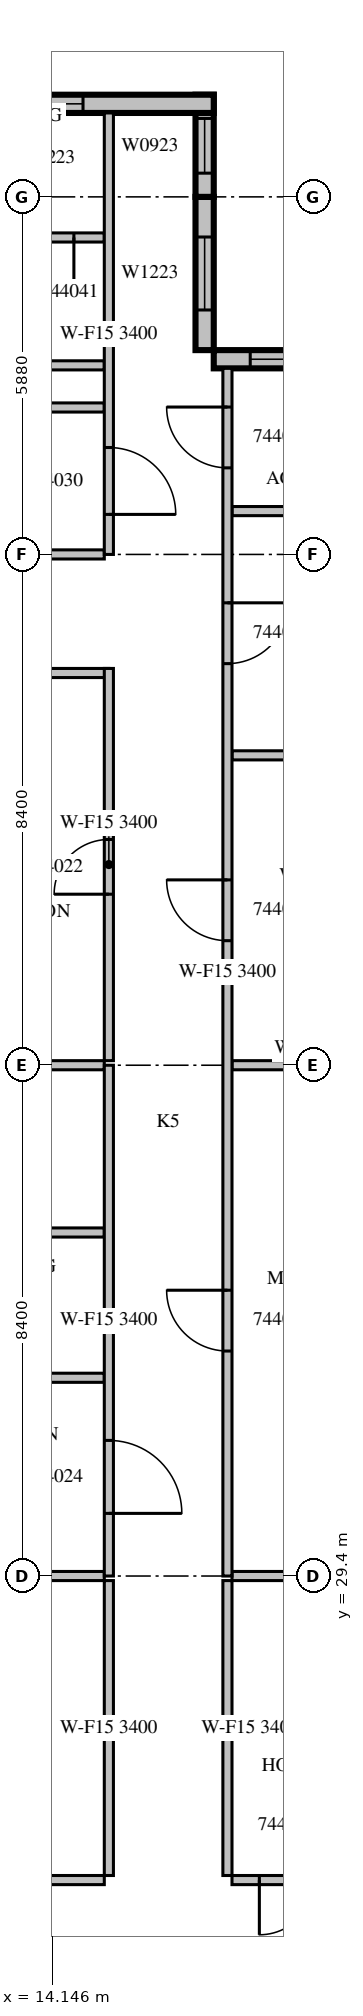
"""IFC4 building model, lengths in metres.
Left out: names, types, materials, properties, quantities, classifications, styles, units other than length and angle.
Written with IfcOpenShell. Run it as: python <this file> out.ifc"""

import sys

from ifc_helpers import new_model, si_unit, direction, frame, frame_2d, origin, place, context, subcontext, project, spatial, rectangle, extrude, source, transform, mapped, element, fill, save


model = new_model("IFC4")
c1 = context("Model", 3, precision=1e-05, world=origin(), true_north=direction((0.0, 1.0)))
c2 = subcontext(c1, "Body", "Model", "MODEL_VIEW")
j1 = project(units=[si_unit("LENGTHUNIT", "METRE"), si_unit("PLANEANGLEUNIT", "RADIAN")], contexts=[c1])
p1 = place(None, origin())
s1 = spatial("IfcSite", under=j1, at=p1, CompositionType="ELEMENT")
p2 = place(p1, origin())
s2 = spatial("IfcBuilding", under=s1, at=p2, CompositionType="ELEMENT")
p3 = place(p2, frame((0.0, 0.0, 200.6)))
s3 = spatial("IfcBuildingStorey", under=s2, at=p3, CompositionType="ELEMENT", Elevation=200.6)
m1 = source(origin(), c2, "Body", "SweptSolid", [
    extrude(rectangle(XDim=4.2, YDim=0.3, at=frame_2d((2.1, 0.0))), origin(), (0.0, 0.0, 1.0), 3.4),
])
p4 = place(p3, frame((21.0, 49.41, 0.0), z_axis=(0.0, 0.0, 1.0), x_axis=(-1.0, 0.0, 0.0)))
e1 = element("IfcWall", 1, at=p4, inside=s3, PredefinedType="STANDARD", context=c2, shape_type="MappedRepresentation", body=[
    mapped(m1, transform((0.0, 0.0, 0.0), scale=1.0)),
])
m2 = source(origin(), c2, "Body", "SweptSolid", [
    extrude(rectangle(XDim=3.0, YDim=2.3, at=frame_2d((1.5, 1.15))), frame((0.0, 0.16, 0.0), z_axis=(0.0, -1.0, 0.0), x_axis=(1.0, 0.0, 0.0)), (0.0, 0.0, 1.0), 0.32),
])
p5 = place(p4, frame((0.6, 0.0, 0.6)))
e2 = element("IfcOpeningElement", 2, at=p5, cuts=e1, PredefinedType="OPENING", context=c2, shape_type="MappedRepresentation", body=[
    mapped(m2, transform((0.0, 0.0, 0.0), scale=1.0)),
])
m3 = source(origin(), c2, "Body", "SweptSolid", [
    extrude(rectangle(XDim=2.52, YDim=0.3, at=frame_2d((1.26, 0.0))), origin(), (0.0, 0.0, 1.0), 3.4),
])
p6 = place(p3, frame((16.65, 49.56, 0.0), z_axis=(0.0, 0.0, 1.0), x_axis=(0.0, 1.0, 0.0)))
e3 = element("IfcWall", 3, at=p6, inside=s3, PredefinedType="STANDARD", context=c2, shape_type="MappedRepresentation", body=[
    mapped(m3, transform((0.0, 0.0, 0.0), scale=1.0)),
])
m4 = source(origin(), c2, "Body", "SweptSolid", [
    extrude(rectangle(XDim=1.2, YDim=2.3, at=frame_2d((0.6, 1.15))), frame((0.0, 0.16, 0.0), z_axis=(0.0, -1.0, 0.0), x_axis=(1.0, 0.0, 0.0)), (0.0, 0.0, 1.0), 0.32),
])
p7 = place(p6, frame((0.66, 0.0, 0.6)))
e4 = element("IfcOpeningElement", 4, at=p7, cuts=e3, PredefinedType="OPENING", context=c2, shape_type="MappedRepresentation", body=[
    mapped(m4, transform((0.0, 0.0, 0.0), scale=1.0)),
])
m5 = source(origin(), c2, "Body", "SweptSolid", [
    extrude(rectangle(XDim=1.68, YDim=0.3, at=frame_2d((0.84, 0.0))), origin(), (0.0, 0.0, 1.0), 3.4),
])
p8 = place(p3, frame((16.65, 52.08, 0.0), z_axis=(0.0, 0.0, 1.0), x_axis=(0.0, 1.0, 0.0)))
e5 = element("IfcWall", 5, at=p8, inside=s3, PredefinedType="STANDARD", context=c2, shape_type="MappedRepresentation", body=[
    mapped(m5, transform((0.0, 0.0, 0.0), scale=1.0)),
])
m6 = source(origin(), c2, "Body", "SweptSolid", [
    extrude(rectangle(XDim=0.9, YDim=2.3, at=frame_2d((0.45, 1.15))), frame((0.0, 0.16, 0.0), z_axis=(0.0, -1.0, 0.0), x_axis=(1.0, 0.0, 0.0)), (0.0, 0.0, 1.0), 0.32),
])
p9 = place(p8, frame((0.39, 0.0, 0.6)))
e6 = element("IfcOpeningElement", 6, at=p9, cuts=e5, PredefinedType="OPENING", context=c2, shape_type="MappedRepresentation", body=[
    mapped(m6, transform((0.0, 0.0, 0.0), scale=1.0)),
])
m7 = source(origin(), c2, "Body", "SweptSolid", [
    extrude(rectangle(XDim=10.5, YDim=0.3, at=frame_2d((5.25, 0.0))), origin(), (0.0, 0.0, 1.0), 3.4),
])
p10 = place(p3, frame((16.8, 53.61, 0.0), z_axis=(0.0, 0.0, 1.0), x_axis=(-1.0, 0.0, 0.0)))
e7 = element("IfcWall", 7, at=p10, inside=s3, PredefinedType="STANDARD", context=c2, shape_type="MappedRepresentation", body=[
    mapped(m7, transform((0.0, 0.0, 0.0), scale=1.0)),
])
p11 = place(p10, frame((2.15, 0.0, 0.6)))
e8 = element("IfcOpeningElement", 8, at=p11, cuts=e7, PredefinedType="OPENING", context=c2, shape_type="MappedRepresentation", body=[
    mapped(m4, transform((0.0, 0.0, 0.0), scale=1.0)),
])
m8 = source(origin(), c2, "Body", "SweptSolid", [
    extrude(rectangle(XDim=1.8, YDim=2.3, at=frame_2d((0.9, 1.15))), frame((0.0, 0.16, 0.0), z_axis=(0.0, -1.0, 0.0), x_axis=(1.0, 0.0, 0.0)), (0.0, 0.0, 1.0), 0.32),
])
p12 = place(p10, frame((8.025, 0.0, 0.6)))
e9 = element("IfcOpeningElement", 9, at=p12, cuts=e7, PredefinedType="OPENING", context=c2, shape_type="MappedRepresentation", body=[
    mapped(m8, transform((0.0, 0.0, 0.0), scale=1.0)),
])
m9 = source(origin(), c2, "Body", "SweptSolid", [
    extrude(rectangle(XDim=8.495, YDim=0.15, at=frame_2d((4.247, 0.0))), origin(), (0.0, 0.0, 1.0), 3.4),
])
p13 = place(p3, frame((6.505, 24.4, 0.0), z_axis=(0.0, 0.0, 1.0), x_axis=(1.0, 0.0, 0.0)))
e10 = element("IfcWall", 10, at=p13, inside=s3, PredefinedType="PARTITIONING", context=c2, shape_type="MappedRepresentation", body=[
    mapped(m9, transform((0.0, 0.0, 0.0), scale=1.0)),
])
m10 = source(origin(), c2, "Body", "SweptSolid", [
    extrude(rectangle(XDim=0.9, YDim=2.1, at=frame_2d((0.45, 1.05))), frame((0.0, 0.085, 0.0), z_axis=(0.0, -1.0, 0.0), x_axis=(1.0, 0.0, 0.0)), (0.0, 0.0, 1.0), 0.17),
])
p14 = place(p13, frame((1.045, 0.0, 0.0)))
e11 = element("IfcOpeningElement", 11, at=p14, cuts=e10, PredefinedType="OPENING", context=c2, shape_type="MappedRepresentation", body=[
    mapped(m10, transform((0.0, 0.0, 0.0), scale=1.0)),
])
p15 = place(p13, frame((6.12, 0.0, 0.0)))
e12 = element("IfcOpeningElement", 12, at=p15, cuts=e10, PredefinedType="OPENING", context=c2, shape_type="MappedRepresentation", body=[
    mapped(m10, transform((0.0, 0.0, 0.0), scale=1.0)),
])
m11 = source(origin(), c2, "Body", "SweptSolid", [
    extrude(rectangle(XDim=3.6, YDim=0.15, at=frame_2d((1.8, 0.0))), origin(), (0.0, 0.0, 1.0), 3.4),
])
p16 = place(p3, frame((17.1, 24.4, 0.0), z_axis=(0.0, 0.0, 1.0), x_axis=(1.0, 0.0, 0.0)))
e13 = element("IfcWall", 13, at=p16, inside=s3, PredefinedType="PARTITIONING", context=c2, shape_type="MappedRepresentation", body=[
    mapped(m11, transform((0.0, 0.0, 0.0), scale=1.0)),
])
p17 = place(p16, frame((0.45, 0.0, 0.0)))
e14 = element("IfcOpeningElement", 14, at=p17, cuts=e13, PredefinedType="OPENING", context=c2, shape_type="MappedRepresentation", body=[
    mapped(m10, transform((0.0, 0.0, 0.0), scale=1.0)),
])
m12 = source(origin(), c2, "Body", "SweptSolid", [
    extrude(rectangle(XDim=4.85, YDim=0.15, at=frame_2d((2.425, 0.0))), origin(), (0.0, 0.0, 1.0), 3.4),
])
for number, where, z_axis, x_axis in (
    (15, (15.075, 24.475, 0.0), (0.0, 0.0, 1.0), (0.0, 1.0, 0.0)),
    (16, (17.025, 29.325, 0.0), (0.0, 0.0, 1.0), (0.0, -1.0, 0.0)),
):
    element("IfcWall", number, at=place(p3, frame(where, z_axis=z_axis, x_axis=x_axis)), inside=s3, PredefinedType="PARTITIONING", context=c2, shape_type="MappedRepresentation", body=[
        mapped(m12, transform((0.0, 0.0, 0.0), scale=1.0)),
    ])
m13 = source(origin(), c2, "Body", "SweptSolid", [
    extrude(rectangle(XDim=4.051, YDim=0.15, at=frame_2d((2.026, 0.0))), origin(), (0.0, 0.0, 1.0), 3.4),
])
p18 = place(p3, frame((15.0, 29.4, 0.0), z_axis=(0.0, 0.0, 1.0), x_axis=(-1.0, 0.0, 0.0)))
e17 = element("IfcWall", 17, at=p18, inside=s3, PredefinedType="PARTITIONING", context=c2, shape_type="MappedRepresentation", body=[
    mapped(m13, transform((0.0, 0.0, 0.0), scale=1.0)),
])
m14 = source(origin(), c2, "Body", "SweptSolid", [
    extrude(rectangle(XDim=3.001, YDim=0.15, at=frame_2d((1.5, 0.0))), origin(), (0.0, 0.0, 1.0), 3.4),
])
p19 = place(p3, frame((20.101, 29.4, 0.0), z_axis=(0.0, 0.0, 1.0), x_axis=(-1.0, 0.0, 0.0)))
e18 = element("IfcWall", 18, at=p19, inside=s3, PredefinedType="PARTITIONING", context=c2, shape_type="MappedRepresentation", body=[
    mapped(m14, transform((0.0, 0.0, 0.0), scale=1.0)),
])
m15 = source(origin(), c2, "Body", "SweptSolid", [
    extrude(rectangle(XDim=3.975, YDim=0.15, at=frame_2d((1.988, 0.0))), origin(), (0.0, 0.0, 1.0), 3.4),
])
p20 = place(p3, frame((15.075, 44.25, 0.0), z_axis=(0.0, 0.0, 1.0), x_axis=(-1.0, 0.0, 0.0)))
e19 = element("IfcWall", 19, at=p20, inside=s3, PredefinedType="PARTITIONING", context=c2, shape_type="MappedRepresentation", body=[
    mapped(m15, transform((0.0, 0.0, 0.0), scale=1.0)),
])
m16 = source(origin(), c2, "Body", "SweptSolid", [
    extrude(rectangle(XDim=6.45, YDim=0.15, at=frame_2d((3.225, 0.0))), origin(), (0.0, 0.0, 1.0), 3.4),
])
p21 = place(p3, frame((15.075, 37.875, 0.0), z_axis=(0.0, 0.0, 1.0), x_axis=(0.0, 1.0, 0.0)))
e20 = element("IfcWall", 20, at=p21, inside=s3, PredefinedType="PARTITIONING", context=c2, shape_type="MappedRepresentation", body=[
    mapped(m16, transform((0.0, 0.0, 0.0), scale=1.0)),
])
p22 = place(p21, frame((2.737, 0.0, 0.0)))
e21 = element("IfcOpeningElement", 21, at=p22, cuts=e20, PredefinedType="OPENING", context=c2, shape_type="MappedRepresentation", body=[
    mapped(m10, transform((0.0, 0.0, 0.0), scale=1.0)),
])
m17 = source(origin(), c2, "Body", "SweptSolid", [
    extrude(rectangle(XDim=3.9, YDim=0.15, at=frame_2d((1.95, 0.0))), origin(), (0.0, 0.0, 1.0), 3.4),
])
for number, where, z_axis, x_axis in (
    (22, (15.0, 32.66, 0.0), (0.0, 0.0, 1.0), (-1.0, 0.0, 0.0)),
    (23, (15.0, 35.049, 0.0), (0.0, 0.0, 1.0), (-1.0, 0.0, 0.0)),
    (24, (15.0, 37.8, 0.0), (0.0, 0.0, 1.0), (-1.0, 0.0, 0.0)),
    (25, (15.0, 48.617, 0.0), (0.0, 0.0, 1.0), (-1.0, 0.0, 0.0)),
    (26, (15.0, 49.309, 0.0), (0.0, 0.0, 1.0), (-1.0, 0.0, 0.0)),
):
    element("IfcWall", number, at=place(p3, frame(where, z_axis=z_axis, x_axis=x_axis)), inside=s3, PredefinedType="PARTITIONING", context=c2, shape_type="MappedRepresentation", body=[
        mapped(m17, transform((0.0, 0.0, 0.0), scale=1.0)),
    ])
p23 = place(p3, frame((15.0, 51.412, 0.0), z_axis=(0.0, 0.0, 1.0), x_axis=(-1.0, 0.0, 0.0)))
e27 = element("IfcWall", 27, at=p23, inside=s3, PredefinedType="PARTITIONING", context=c2, shape_type="MappedRepresentation", body=[
    mapped(m17, transform((0.0, 0.0, 0.0), scale=1.0)),
])
p24 = place(p23, frame((1.5, 0.0, 0.0)))
e28 = element("IfcOpeningElement", 28, at=p24, cuts=e27, PredefinedType="OPENING", context=c2, shape_type="MappedRepresentation", body=[
    mapped(m10, transform((0.0, 0.0, 0.0), scale=1.0)),
])
p25 = place(p23, frame((0.5, 0.0, 0.0)))
e29 = element("IfcOpeningElement", 29, at=p25, cuts=e27, PredefinedType="OPENING", context=c2, shape_type="MappedRepresentation", body=[
    mapped(m10, transform((0.0, 0.0, 0.0), scale=1.0)),
])
p26 = place(p23, frame((2.5, 0.0, 0.0)))
e30 = element("IfcOpeningElement", 30, at=p26, cuts=e27, PredefinedType="OPENING", context=c2, shape_type="MappedRepresentation", body=[
    mapped(m10, transform((0.0, 0.0, 0.0), scale=1.0)),
])
p27 = place(p3, frame((15.0, 46.2, 0.0), z_axis=(0.0, 0.0, 1.0), x_axis=(-1.0, 0.0, 0.0)))
e31 = element("IfcWall", 31, at=p27, inside=s3, PredefinedType="PARTITIONING", context=c2, shape_type="MappedRepresentation", body=[
    mapped(m17, transform((0.0, 0.0, 0.0), scale=1.0)),
])
for number, where, z_axis, x_axis in (
    (32, (17.1, 42.896, 0.0), (0.0, 0.0, 1.0), (1.0, 0.0, 0.0)),
    (33, (17.1, 46.913, 0.0), (0.0, 0.0, 1.0), (1.0, 0.0, 0.0)),
):
    element("IfcWall", number, at=place(p3, frame(where, z_axis=z_axis, x_axis=x_axis)), inside=s3, PredefinedType="PARTITIONING", context=c2, shape_type="MappedRepresentation", body=[
        mapped(m11, transform((0.0, 0.0, 0.0), scale=1.0)),
    ])
p28 = place(p3, frame((20.101, 37.8, 0.0), z_axis=(0.0, 0.0, 1.0), x_axis=(-1.0, 0.0, 0.0)))
e34 = element("IfcWall", 34, at=p28, inside=s3, PredefinedType="PARTITIONING", context=c2, shape_type="MappedRepresentation", body=[
    mapped(m14, transform((0.0, 0.0, 0.0), scale=1.0)),
])
m18 = source(origin(), c2, "Body", "SweptSolid", [
    extrude(rectangle(XDim=8.4, YDim=0.15, at=frame_2d((4.2, 0.0))), origin(), (0.0, 0.0, 1.0), 3.4),
])
p29 = place(p3, frame((15.075, 29.4, 0.0), z_axis=(0.0, 0.0, 1.0), x_axis=(0.0, 1.0, 0.0)))
e35 = element("IfcWall", 35, at=p29, inside=s3, PredefinedType="PARTITIONING", context=c2, shape_type="MappedRepresentation", body=[
    mapped(m18, transform((0.0, 0.0, 0.0), scale=1.0)),
])
m19 = source(origin(), c2, "Body", "SweptSolid", [
    extrude(rectangle(XDim=1.2, YDim=2.1, at=frame_2d((0.6, 1.05))), frame((0.0, 0.085, 0.0), z_axis=(0.0, -1.0, 0.0), x_axis=(1.0, 0.0, 0.0)), (0.0, 0.0, 1.0), 0.17),
])
p30 = place(p29, frame((1.03, 0.0, 0.0)))
e36 = element("IfcOpeningElement", 36, at=p30, cuts=e35, PredefinedType="OPENING", context=c2, shape_type="MappedRepresentation", body=[
    mapped(m19, transform((0.0, 0.0, 0.0), scale=1.0)),
])
m20 = source(origin(), c2, "Body", "SweptSolid", [
    extrude(rectangle(XDim=7.26, YDim=0.15, at=frame_2d((3.63, 0.0))), origin(), (0.0, 0.0, 1.0), 3.4),
])
p31 = place(p3, frame((15.075, 46.2, 0.0), z_axis=(0.0, 0.0, 1.0), x_axis=(0.0, 1.0, 0.0)))
e37 = element("IfcWall", 37, at=p31, inside=s3, PredefinedType="PARTITIONING", context=c2, shape_type="MappedRepresentation", body=[
    mapped(m20, transform((0.0, 0.0, 0.0), scale=1.0)),
])
m21 = source(origin(), c2, "Body", "SweptSolid", [
    extrude(rectangle(XDim=1.1, YDim=2.1, at=frame_2d((0.55, 1.05))), frame((0.0, 0.085, 0.0), z_axis=(0.0, -1.0, 0.0), x_axis=(1.0, 0.0, 0.0)), (0.0, 0.0, 1.0), 0.17),
])
p32 = place(p31, frame((0.658, 0.0, 0.0)))
e38 = element("IfcOpeningElement", 38, at=p32, cuts=e37, PredefinedType="OPENING", context=c2, shape_type="MappedRepresentation", body=[
    mapped(m21, transform((0.0, 0.0, 0.0), scale=1.0)),
])
m22 = source(origin(), c2, "Body", "SweptSolid", [
    extrude(rectangle(XDim=19.86, YDim=0.15, at=frame_2d((9.93, 0.0))), origin(), (0.0, 0.0, 1.0), 3.4),
])
p33 = place(p3, frame((17.025, 49.26, 0.0), z_axis=(0.0, 0.0, 1.0), x_axis=(0.0, -1.0, 0.0)))
e39 = element("IfcWall", 39, at=p33, inside=s3, PredefinedType="PARTITIONING", context=c2, shape_type="MappedRepresentation", body=[
    mapped(m22, transform((0.0, 0.0, 0.0), scale=1.0)),
])
m23 = source(origin(), c2, "Body", "SweptSolid", [
    extrude(rectangle(XDim=1.0, YDim=2.1, at=frame_2d((0.5, 1.05))), frame((0.0, 0.085, 0.0), z_axis=(0.0, -1.0, 0.0), x_axis=(1.0, 0.0, 0.0)), (0.0, 0.0, 1.0), 0.17),
])
p34 = place(p33, frame((15.16, 0.0, 0.0)))
e40 = element("IfcOpeningElement", 40, at=p34, cuts=e39, PredefinedType="OPENING", context=c2, shape_type="MappedRepresentation", body=[
    mapped(m23, transform((0.0, 0.0, 0.0), scale=1.0)),
])
p35 = place(p33, frame((8.412, 0.0, 0.0)))
e41 = element("IfcOpeningElement", 41, at=p35, cuts=e39, PredefinedType="OPENING", context=c2, shape_type="MappedRepresentation", body=[
    mapped(m23, transform((0.0, 0.0, 0.0), scale=1.0)),
])
p36 = place(p33, frame((3.856, 0.0, 0.0)))
e42 = element("IfcOpeningElement", 42, at=p36, cuts=e39, PredefinedType="OPENING", context=c2, shape_type="MappedRepresentation", body=[
    mapped(m23, transform((0.0, 0.0, 0.0), scale=1.0)),
])
p37 = place(p33, frame((0.636, 0.0, 0.0)))
e43 = element("IfcOpeningElement", 43, at=p37, cuts=e39, PredefinedType="OPENING", context=c2, shape_type="MappedRepresentation", body=[
    mapped(m23, transform((0.0, 0.0, 0.0), scale=1.0)),
])
m24 = source(origin(), c2, "Body", "SweptSolid", [
    extrude(rectangle(XDim=3.0, YDim=2.3, at=frame_2d((1.5, 1.15))), frame((0.0, 0.03, 0.0), z_axis=(0.0, -1.0, 0.0), x_axis=(1.0, 0.0, 0.0)), (0.0, 0.0, 1.0), 0.06),
])
p38 = place(p5, origin())
e44 = element("IfcWindow", 44, at=p38, inside=s3, PartitioningType="SINGLE_PANEL", PredefinedType="WINDOW", context=c2, shape_type="MappedRepresentation", body=[
    mapped(m24, transform((0.0, 0.0, 0.0), scale=1.0)),
])
fill(e2, e44)
m25 = source(origin(), c2, "Body", "SweptSolid", [
    extrude(rectangle(XDim=1.2, YDim=2.3, at=frame_2d((0.6, 1.15))), frame((0.0, 0.03, 0.0), z_axis=(0.0, -1.0, 0.0), x_axis=(1.0, 0.0, 0.0)), (0.0, 0.0, 1.0), 0.06),
])
p39 = place(p7, origin())
e45 = element("IfcWindow", 45, at=p39, inside=s3, PartitioningType="SINGLE_PANEL", PredefinedType="WINDOW", context=c2, shape_type="MappedRepresentation", body=[
    mapped(m25, transform((0.0, 0.0, 0.0), scale=1.0)),
])
fill(e4, e45)
m26 = source(origin(), c2, "Body", "SweptSolid", [
    extrude(rectangle(XDim=0.9, YDim=2.3, at=frame_2d((0.45, 1.15))), frame((0.0, 0.03, 0.0), z_axis=(0.0, -1.0, 0.0), x_axis=(1.0, 0.0, 0.0)), (0.0, 0.0, 1.0), 0.06),
])
p40 = place(p9, origin())
e46 = element("IfcWindow", 46, at=p40, inside=s3, PartitioningType="SINGLE_PANEL", PredefinedType="WINDOW", context=c2, shape_type="MappedRepresentation", body=[
    mapped(m26, transform((0.0, 0.0, 0.0), scale=1.0)),
])
fill(e6, e46)
p41 = place(p11, origin())
e47 = element("IfcWindow", 47, at=p41, inside=s3, PartitioningType="SINGLE_PANEL", PredefinedType="WINDOW", context=c2, shape_type="MappedRepresentation", body=[
    mapped(m25, transform((0.0, 0.0, 0.0), scale=1.0)),
])
fill(e8, e47)
m27 = source(origin(), c2, "Body", "SweptSolid", [
    extrude(rectangle(XDim=0.9, YDim=2.1, at=frame_2d((0.45, 1.05))), frame((0.0, 0.025, 0.0), z_axis=(0.0, -1.0, 0.0), x_axis=(1.0, 0.0, 0.0)), (0.0, 0.0, 1.0), 0.05),
])
p42 = place(p17, origin())
e48 = element("IfcDoor", 48, at=p42, inside=s3, OperationType="SINGLE_SWING_RIGHT", PredefinedType="DOOR", context=c2, shape_type="MappedRepresentation", body=[
    mapped(m27, transform((0.0, 0.0, 0.0), scale=1.0)),
])
fill(e14, e48)
p43 = place(p22, origin())
e49 = element("IfcDoor", 49, at=p43, inside=s3, OperationType="SINGLE_SWING_LEFT", PredefinedType="DOOR", context=c2, shape_type="MappedRepresentation", body=[
    mapped(m27, transform((0.0, 0.0, 0.0), scale=1.0)),
])
fill(e21, e49)
m28 = source(origin(), c2, "Body", "SweptSolid", [
    extrude(rectangle(XDim=1.2, YDim=2.1, at=frame_2d((0.6, 1.05))), frame((0.0, 0.025, 0.0), z_axis=(0.0, -1.0, 0.0), x_axis=(1.0, 0.0, 0.0)), (0.0, 0.0, 1.0), 0.05),
])
p44 = place(p30, origin())
e50 = element("IfcDoor", 50, at=p44, inside=s3, OperationType="SINGLE_SWING_RIGHT", PredefinedType="DOOR", context=c2, shape_type="MappedRepresentation", body=[
    mapped(m28, transform((0.0, 0.0, 0.0), scale=1.0)),
])
fill(e36, e50)
m29 = source(origin(), c2, "Body", "SweptSolid", [
    extrude(rectangle(XDim=1.1, YDim=2.1, at=frame_2d((0.55, 1.05))), frame((0.0, 0.025, 0.0), z_axis=(0.0, -1.0, 0.0), x_axis=(1.0, 0.0, 0.0)), (0.0, 0.0, 1.0), 0.05),
])
p45 = place(p32, origin())
e51 = element("IfcDoor", 51, at=p45, inside=s3, OperationType="SINGLE_SWING_RIGHT", PredefinedType="DOOR", context=c2, shape_type="MappedRepresentation", body=[
    mapped(m29, transform((0.0, 0.0, 0.0), scale=1.0)),
])
fill(e38, e51)
m30 = source(origin(), c2, "Body", "SweptSolid", [
    extrude(rectangle(XDim=1.0, YDim=2.1, at=frame_2d((0.5, 1.05))), frame((0.0, 0.025, 0.0), z_axis=(0.0, -1.0, 0.0), x_axis=(1.0, 0.0, 0.0)), (0.0, 0.0, 1.0), 0.05),
])
p46 = place(p34, origin())
e52 = element("IfcDoor", 52, at=p46, inside=s3, OperationType="SINGLE_SWING_RIGHT", PredefinedType="DOOR", context=c2, shape_type="MappedRepresentation", body=[
    mapped(m30, transform((0.0, 0.0, 0.0), scale=1.0)),
])
fill(e40, e52)
p47 = place(p35, origin())
e53 = element("IfcDoor", 53, at=p47, inside=s3, OperationType="SINGLE_SWING_RIGHT", PredefinedType="DOOR", context=c2, shape_type="MappedRepresentation", body=[
    mapped(m30, transform((0.0, 0.0, 0.0), scale=1.0)),
])
fill(e41, e53)
p48 = place(p36, origin())
e54 = element("IfcDoor", 54, at=p48, inside=s3, OperationType="SINGLE_SWING_LEFT", PredefinedType="DOOR", context=c2, shape_type="MappedRepresentation", body=[
    mapped(m30, transform((0.0, 0.0, 0.0), scale=1.0)),
])
fill(e42, e54)
p49 = place(p37, origin())
e55 = element("IfcDoor", 55, at=p49, inside=s3, OperationType="SINGLE_SWING_RIGHT", PredefinedType="DOOR", context=c2, shape_type="MappedRepresentation", body=[
    mapped(m30, transform((0.0, 0.0, 0.0), scale=1.0)),
])
fill(e43, e55)
p50 = place(p25, origin())
e56 = element("IfcDoor", 56, at=p50, inside=s3, OperationType="SINGLE_SWING_LEFT", PredefinedType="DOOR", context=c2, shape_type="MappedRepresentation", body=[
    mapped(m27, transform((0.0, 0.0, 0.0), scale=1.0)),
])
fill(e29, e56)
save(model, sys.argv[1])
